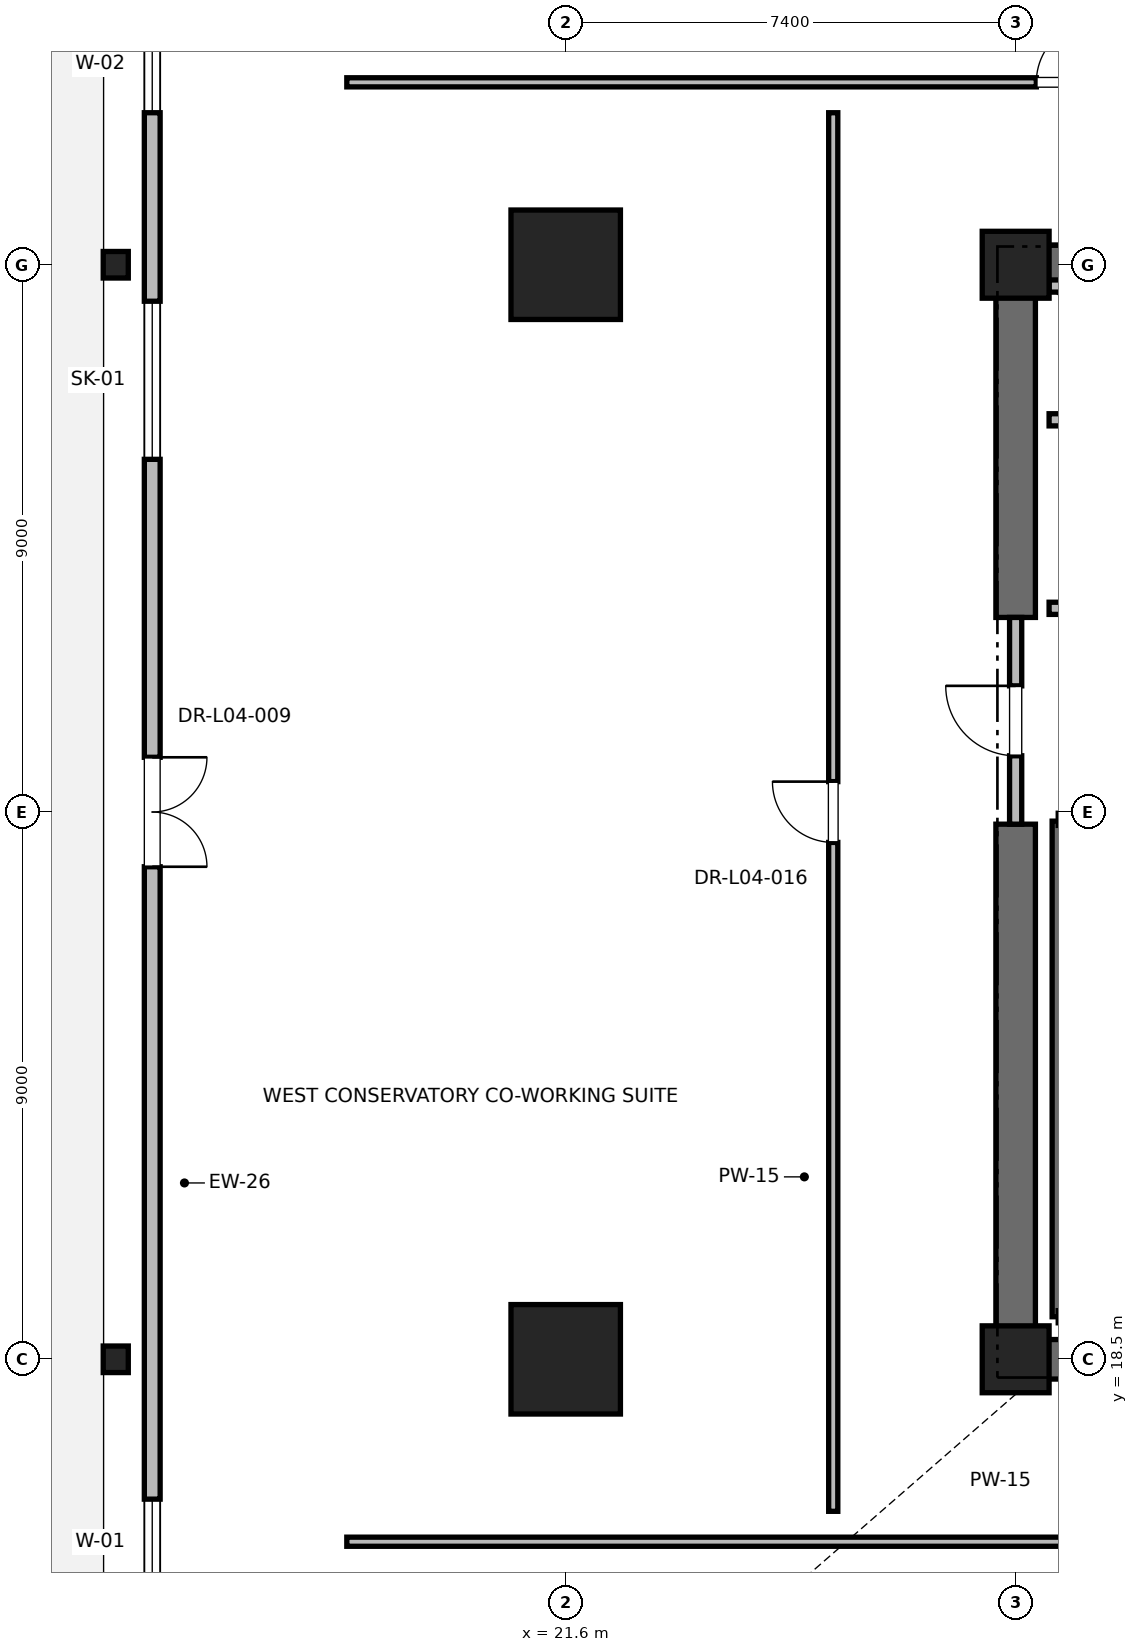
"""IFC4 building model, lengths in metres.
Left out: names, types, materials, properties, quantities, classifications, styles, units other than length and angle.
Written with IfcOpenShell. Run it as: python <this file> out.ifc"""

import sys

from ifc_helpers import new_model, si_unit, direction, frame, frame_2d, origin, origin_2d, place, context, subcontext, project, spatial, rectangle, i_section, extrude, element, fill, save


model = new_model("IFC4")
c1 = context("Model", 3, precision=1e-05, world=origin(), true_north=direction((0.0, 1.0)))
c2 = subcontext(c1, "Body", "Model", "MODEL_VIEW")
j1 = project(units=[si_unit("LENGTHUNIT", "METRE"), si_unit("PLANEANGLEUNIT", "RADIAN")], contexts=[c1])
p1 = place(None, origin())
s1 = spatial("IfcSite", under=j1, at=p1, CompositionType="ELEMENT")
p2 = place(p1, origin())
s2 = spatial("IfcBuilding", under=s1, at=p2, CompositionType="ELEMENT")
p3 = place(p2, frame((0.0, 0.0, 21.6)))
s3 = spatial("IfcBuildingStorey", under=s2, at=p3, CompositionType="ELEMENT", Elevation=21.6)
for number, where, z_axis, x_axis in (
    (1, (21.6, 18.5, 0.0), (0.0, 0.0, 1.0), (1.0, 0.0, 0.0)),
    (2, (21.6, 36.5, 0.0), (0.0, 0.0, 1.0), (1.0, 0.0, 0.0)),
):
    element("IfcColumn", number, at=place(p3, frame(where, z_axis=z_axis, x_axis=x_axis)), inside=s3, PredefinedType="COLUMN", context=c2, shape_type="SweptSolid", body=[
        extrude(rectangle(XDim=1.8, YDim=1.8, at=origin_2d()), origin(), (0.0, 0.0, 1.0), 6.0),
    ])
for number, where, z_axis, x_axis in (
    (3, (14.2, 18.5, 0.0), (0.0, 0.0, 1.0), (1.0, 0.0, 0.0)),
    (4, (14.2, 36.5, 0.0), (0.0, 0.0, 1.0), (1.0, 0.0, 0.0)),
):
    element("IfcColumn", number, at=place(p3, frame(where, z_axis=z_axis, x_axis=x_axis)), inside=s3, PredefinedType="COLUMN", context=c2, shape_type="SweptSolid", body=[
        extrude(i_section(OverallWidth=0.412, OverallDepth=0.437, WebThickness=0.036, FlangeThickness=0.058, FilletRadius=0.015, at=origin_2d()), origin(), (0.0, 0.0, 1.0), 6.0),
    ])
for number, where, z_axis, x_axis in (
    (5, (29.0, 18.5, 0.0), (0.0, 0.0, 1.0), (1.0, 0.0, 0.0)),
    (6, (29.0, 36.5, 0.0), (0.0, 0.0, 1.0), (1.0, 0.0, 0.0)),
):
    element("IfcColumn", number, at=place(p3, frame(where, z_axis=z_axis, x_axis=x_axis)), inside=s3, PredefinedType="PILASTER", context=c2, shape_type="SweptSolid", body=[
        extrude(rectangle(XDim=1.1, YDim=1.1, at=origin_2d()), origin(), (0.0, 0.0, 1.0), 6.0),
    ])
p4 = place(p3, frame((29.0, 18.5, 0.0), z_axis=(0.0, 0.0, 1.0), x_axis=(1.0, 0.0, 0.0)))
e7 = element("IfcWall", 7, at=p4, inside=s3, PredefinedType="SHEAR", context=c2, shape_type="SweptSolid", body=[
    extrude(rectangle(XDim=9.2, YDim=0.65, at=frame_2d((4.6, 0.0))), origin(), (0.0, 0.0, 1.0), 5.76),
])
p5 = place(p3, frame((29.0, 36.5, 0.0), z_axis=(0.0, 0.0, 1.0), x_axis=(1.0, 0.0, 0.0)))
e8 = element("IfcWall", 8, at=p5, inside=s3, PredefinedType="SHEAR", context=c2, shape_type="SweptSolid", body=[
    extrude(rectangle(XDim=5.8, YDim=0.65, at=frame_2d((2.9, 0.0))), origin(), (0.0, 0.0, 1.0), 5.76),
])
p6 = place(p3, frame((29.0, 18.5, 0.0), z_axis=(0.0, 0.0, 1.0), x_axis=(0.0, 1.0, 0.0)))
e9 = element("IfcWall", 9, at=p6, inside=s3, PredefinedType="SHEAR", context=c2, shape_type="SweptSolid", body=[
    extrude(rectangle(XDim=8.8, YDim=0.65, at=frame_2d((4.4, 0.0))), origin(), (0.0, 0.0, 1.0), 5.76),
])
p7 = place(p3, frame((29.0, 30.7, 0.0), z_axis=(0.0, 0.0, 1.0), x_axis=(0.0, 1.0, 0.0)))
e10 = element("IfcWall", 10, at=p7, inside=s3, PredefinedType="SHEAR", context=c2, shape_type="SweptSolid", body=[
    extrude(rectangle(XDim=5.8, YDim=0.65, at=frame_2d((2.9, 0.0))), origin(), (0.0, 0.0, 1.0), 5.76),
])
p8 = place(p3, frame((14.8, 43.4, 0.0), z_axis=(0.0, 0.0, 1.0), x_axis=(0.0, -1.0, 0.0)))
e11 = element("IfcWall", 11, at=p8, inside=s3, PredefinedType="PARAPET", context=c2, shape_type="SweptSolid", body=[
    extrude(rectangle(XDim=31.8, YDim=0.26, at=frame_2d((15.9, 0.0))), origin(), (0.0, 0.0, 1.0), 4.889),
])
p9 = place(p8, frame((2.8, 0.0, 0.9)))
e12 = element("IfcOpeningElement", 12, at=p9, cuts=e11, PredefinedType="OPENING", context=c2, shape_type="SweptSolid", body=[
    extrude(rectangle(XDim=1.6, YDim=2.1, at=frame_2d((0.8, 1.05))), frame((0.0, 0.13, 0.0), z_axis=(0.0, -1.0, 0.0), x_axis=(1.0, 0.0, 0.0)), (0.0, 0.0, 1.0), 0.26),
])
p10 = place(p8, frame((7.5, 0.0, 2.85)))
e13 = element("IfcOpeningElement", 13, at=p10, cuts=e11, PredefinedType="OPENING", context=c2, shape_type="SweptSolid", body=[
    extrude(rectangle(XDim=2.6, YDim=1.4, at=frame_2d((1.3, 0.7))), frame((0.0, 0.13, 0.0), z_axis=(0.0, -1.0, 0.0), x_axis=(1.0, 0.0, 0.0)), (0.0, 0.0, 1.0), 0.26),
])
p11 = place(p8, frame((15.0, 0.0, 0.0)))
e14 = element("IfcOpeningElement", 14, at=p11, cuts=e11, PredefinedType="OPENING", context=c2, shape_type="SweptSolid", body=[
    extrude(rectangle(XDim=1.8, YDim=2.4, at=frame_2d((0.9, 1.2))), frame((0.0, 0.13, 0.0), z_axis=(0.0, -1.0, 0.0), x_axis=(1.0, 0.0, 0.0)), (0.0, 0.0, 1.0), 0.26),
])
p12 = place(p8, frame((27.2, 0.0, 0.95)))
e15 = element("IfcOpeningElement", 15, at=p12, cuts=e11, PredefinedType="OPENING", context=c2, shape_type="SweptSolid", body=[
    extrude(rectangle(XDim=1.4, YDim=2.0, at=frame_2d((0.7, 1.0))), frame((0.0, 0.13, 0.0), z_axis=(0.0, -1.0, 0.0), x_axis=(1.0, 0.0, 0.0)), (0.0, 0.0, 1.0), 0.26),
])
p13 = place(p3, frame((29.7, 19.2, 0.0), z_axis=(0.0, 0.0, 1.0), x_axis=(0.0, 1.0, 0.0)))
e16 = element("IfcWall", 16, at=p13, inside=s3, PredefinedType="SOLIDWALL", context=c2, shape_type="SweptSolid", body=[
    extrude(rectangle(XDim=8.15, YDim=0.2, at=frame_2d((4.075, 0.0))), origin(), (0.0, 0.0, 1.0), 5.76),
])
p14 = place(p3, frame((29.0, 27.3, 0.0), z_axis=(0.0, 0.0, 1.0), x_axis=(0.0, 1.0, 0.0)))
e17 = element("IfcWall", 17, at=p14, inside=s3, PredefinedType="PARTITIONING", context=c2, shape_type="SweptSolid", body=[
    extrude(rectangle(XDim=3.4, YDim=0.2, at=frame_2d((1.7, 0.0))), origin(), (0.0, 0.0, 1.0), 4.54),
])
p15 = place(p14, frame((1.125, 0.0, 0.0)))
e18 = element("IfcOpeningElement", 18, at=p15, cuts=e17, PredefinedType="OPENING", context=c2, shape_type="SweptSolid", body=[
    extrude(rectangle(XDim=1.15, YDim=2.2, at=frame_2d((0.575, 1.1))), frame((0.0, 0.1, 0.0), z_axis=(0.0, -1.0, 0.0), x_axis=(1.0, 0.0, 0.0)), (0.0, 0.0, 1.0), 0.2),
])
p16 = place(p3, frame((29.55, 30.85, 0.0), z_axis=(0.0, 0.0, 1.0), x_axis=(1.0, 0.0, 0.0)))
e19 = element("IfcWall", 19, at=p16, inside=s3, PredefinedType="SOLIDWALL", context=c2, shape_type="SweptSolid", body=[
    extrude(rectangle(XDim=2.6, YDim=0.2, at=frame_2d((1.3, 0.0))), origin(), (0.0, 0.0, 1.0), 4.54),
])
p17 = place(p16, frame((0.75, 0.0, 0.0)))
e20 = element("IfcOpeningElement", 20, at=p17, cuts=e19, PredefinedType="OPENING", context=c2, shape_type="SweptSolid", body=[
    extrude(rectangle(XDim=1.1, YDim=2.2, at=frame_2d((0.55, 1.1))), frame((0.0, 0.1, 0.0), z_axis=(0.0, -1.0, 0.0), x_axis=(1.0, 0.0, 0.0)), (0.0, 0.0, 1.0), 0.2),
])
p18 = place(p3, frame((29.55, 33.95, 0.0), z_axis=(0.0, 0.0, 1.0), x_axis=(1.0, 0.0, 0.0)))
e21 = element("IfcWall", 21, at=p18, inside=s3, PredefinedType="SOLIDWALL", context=c2, shape_type="SweptSolid", body=[
    extrude(rectangle(XDim=2.8, YDim=0.2, at=frame_2d((1.4, 0.0))), origin(), (0.0, 0.0, 1.0), 5.76),
])
p19 = place(p3, frame((32.35, 36.15, 0.0), z_axis=(0.0, 0.0, 1.0), x_axis=(-1.0, 0.0, 0.0)))
e22 = element("IfcWall", 22, at=p19, inside=s3, PredefinedType="SOLIDWALL", context=c2, shape_type="SweptSolid", body=[
    extrude(rectangle(XDim=2.8, YDim=0.2, at=frame_2d((1.4, 0.0))), origin(), (0.0, 0.0, 1.0), 4.889),
])
p20 = place(p3, frame((18.0, 15.5, 0.0), z_axis=(0.0, 0.0, 1.0), x_axis=(1.0, 0.0, 0.0)))
e23 = element("IfcWall", 23, at=p20, inside=s3, PredefinedType="PARTITIONING", context=c2, shape_type="SweptSolid", body=[
    extrude(rectangle(XDim=44.0, YDim=0.15, at=frame_2d((22.0, 0.0))), origin(), (0.0, 0.0, 1.0), 2.85),
])
p21 = place(p20, frame((21.5, 0.0, 0.0)))
e24 = element("IfcOpeningElement", 24, at=p21, cuts=e23, PredefinedType="OPENING", context=c2, shape_type="SweptSolid", body=[
    extrude(rectangle(XDim=1.0, YDim=2.15, at=frame_2d((0.5, 1.075))), frame((0.0, 0.075, 0.0), z_axis=(0.0, -1.0, 0.0), x_axis=(1.0, 0.0, 0.0)), (0.0, 0.0, 1.0), 0.15),
])
p22 = place(p3, frame((18.0, 39.5, 0.0), z_axis=(0.0, 0.0, 1.0), x_axis=(1.0, 0.0, 0.0)))
e25 = element("IfcWall", 25, at=p22, inside=s3, PredefinedType="PARTITIONING", context=c2, shape_type="SweptSolid", body=[
    extrude(rectangle(XDim=23.75, YDim=0.15, at=frame_2d((11.875, 0.0))), origin(), (0.0, 0.0, 1.0), 2.85),
])
p23 = place(p22, frame((11.34, 0.0, 0.0)))
e26 = element("IfcOpeningElement", 26, at=p23, cuts=e25, PredefinedType="OPENING", context=c2, shape_type="SweptSolid", body=[
    extrude(rectangle(XDim=1.0, YDim=2.15, at=frame_2d((0.5, 1.075))), frame((0.0, 0.075, 0.0), z_axis=(0.0, -1.0, 0.0), x_axis=(1.0, 0.0, 0.0)), (0.0, 0.0, 1.0), 0.15),
])
p24 = place(p3, frame((26.0, 16.0, 0.0), z_axis=(0.0, 0.0, 1.0), x_axis=(0.0, 1.0, 0.0)))
e27 = element("IfcWall", 27, at=p24, inside=s3, PredefinedType="PARTITIONING", context=c2, shape_type="SweptSolid", body=[
    extrude(rectangle(XDim=23.0, YDim=0.15, at=frame_2d((11.5, 0.0))), origin(), (0.0, 0.0, 1.0), 2.85),
])
p25 = place(p24, frame((11.0, 0.0, 0.0)))
e28 = element("IfcOpeningElement", 28, at=p25, cuts=e27, PredefinedType="OPENING", context=c2, shape_type="SweptSolid", body=[
    extrude(rectangle(XDim=1.0, YDim=2.15, at=frame_2d((0.5, 1.075))), frame((0.0, 0.075, 0.0), z_axis=(0.0, -1.0, 0.0), x_axis=(1.0, 0.0, 0.0)), (0.0, 0.0, 1.0), 0.15),
])
p26 = place(p9, origin())
e29 = element("IfcWindow", 29, at=p26, inside=s3, PartitioningType="SINGLE_PANEL", PredefinedType="WINDOW", context=c2, shape_type="SweptSolid", body=[
    extrude(rectangle(XDim=1.6, YDim=2.1, at=frame_2d((0.8, 1.05))), frame((0.0, 0.03, 0.0), z_axis=(0.0, -1.0, 0.0), x_axis=(1.0, 0.0, 0.0)), (0.0, 0.0, 1.0), 0.06),
])
fill(e12, e29)
p27 = place(p10, origin())
e30 = element("IfcWindow", 30, at=p27, inside=s3, PartitioningType="SINGLE_PANEL", PredefinedType="SKYLIGHT", context=c2, shape_type="SweptSolid", body=[
    extrude(rectangle(XDim=2.6, YDim=1.4, at=frame_2d((1.3, 0.7))), frame((0.0, 0.03, 0.0), z_axis=(0.0, -1.0, 0.0), x_axis=(1.0, 0.0, 0.0)), (0.0, 0.0, 1.0), 0.06),
])
fill(e13, e30)
p28 = place(p11, origin())
e31 = element("IfcDoor", 31, at=p28, inside=s3, OperationType="DOUBLE_DOOR_SINGLE_SWING", PredefinedType="DOOR", context=c2, shape_type="SweptSolid", body=[
    extrude(rectangle(XDim=1.8, YDim=2.4, at=frame_2d((0.9, 1.2))), frame((0.0, 0.025, 0.0), z_axis=(0.0, -1.0, 0.0), x_axis=(1.0, 0.0, 0.0)), (0.0, 0.0, 1.0), 0.05),
])
fill(e14, e31)
p29 = place(p12, origin())
e32 = element("IfcWindow", 32, at=p29, inside=s3, PartitioningType="SINGLE_PANEL", PredefinedType="WINDOW", context=c2, shape_type="SweptSolid", body=[
    extrude(rectangle(XDim=1.4, YDim=2.0, at=frame_2d((0.7, 1.0))), frame((0.0, 0.03, 0.0), z_axis=(0.0, -1.0, 0.0), x_axis=(1.0, 0.0, 0.0)), (0.0, 0.0, 1.0), 0.06),
])
fill(e15, e32)
p30 = place(p15, origin())
e33 = element("IfcDoor", 33, at=p30, inside=s3, OperationType="SINGLE_SWING_RIGHT", PredefinedType="DOOR", context=c2, shape_type="SweptSolid", body=[
    extrude(rectangle(XDim=1.15, YDim=2.2, at=frame_2d((0.575, 1.1))), frame((0.0, 0.025, 0.0), z_axis=(0.0, -1.0, 0.0), x_axis=(1.0, 0.0, 0.0)), (0.0, 0.0, 1.0), 0.05),
])
fill(e18, e33)
p31 = place(p23, origin())
e34 = element("IfcDoor", 34, at=p31, inside=s3, OperationType="SINGLE_SWING_RIGHT", PredefinedType="DOOR", context=c2, shape_type="SweptSolid", body=[
    extrude(rectangle(XDim=1.0, YDim=2.15, at=frame_2d((0.5, 1.075))), frame((0.0, 0.025, 0.0), z_axis=(0.0, -1.0, 0.0), x_axis=(1.0, 0.0, 0.0)), (0.0, 0.0, 1.0), 0.05),
])
fill(e26, e34)
p32 = place(p25, origin())
e35 = element("IfcDoor", 35, at=p32, inside=s3, OperationType="SINGLE_SWING_RIGHT", PredefinedType="DOOR", context=c2, shape_type="SweptSolid", body=[
    extrude(rectangle(XDim=1.0, YDim=2.15, at=frame_2d((0.5, 1.075))), frame((0.0, 0.025, 0.0), z_axis=(0.0, -1.0, 0.0), x_axis=(1.0, 0.0, 0.0)), (0.0, 0.0, 1.0), 0.05),
])
fill(e28, e35)
save(model, sys.argv[1])
